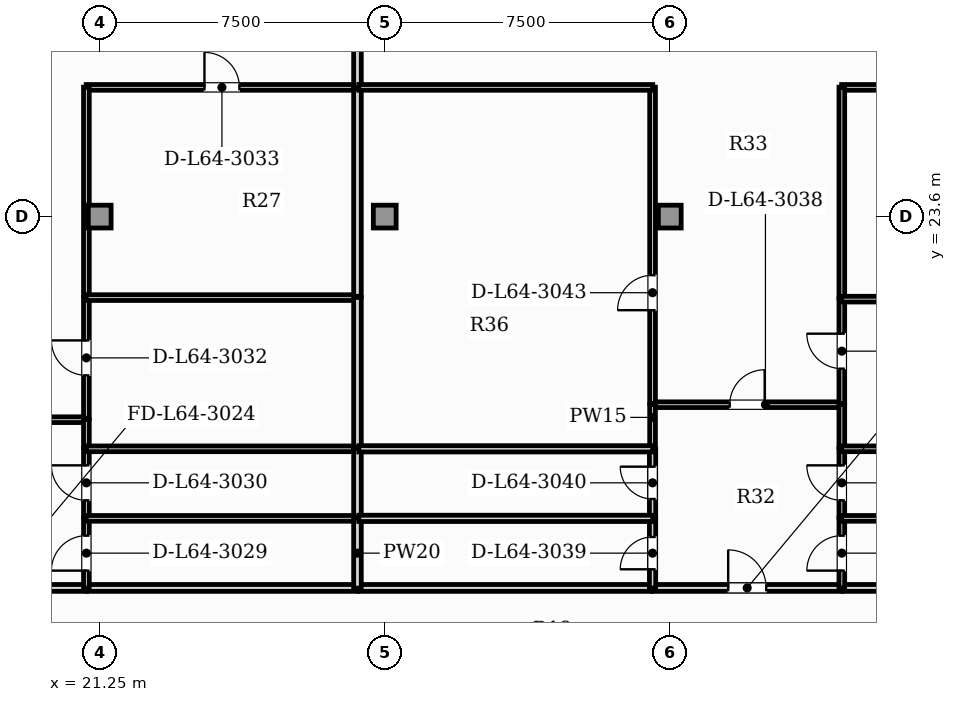
"""IFC4 building model, lengths in metres.
Left out: names, types, materials, properties, quantities, classifications, styles, units other than length and angle.
Written with IfcOpenShell. Run it as: python <this file> out.ifc"""

import sys

from ifc_helpers import new_model, si_unit, direction, frame, frame_2d, origin, origin_2d, place, context, subcontext, project, spatial, rectangle, extrude, element, fill, save


model = new_model("IFC4")
c1 = context("Model", 3, precision=1e-05, world=origin(), true_north=direction((0.0, 1.0)))
c2 = subcontext(c1, "Body", "Model", "MODEL_VIEW")
j1 = project(units=[si_unit("LENGTHUNIT", "METRE"), si_unit("PLANEANGLEUNIT", "RADIAN")], contexts=[c1])
p1 = place(None, origin())
s1 = spatial("IfcSite", under=j1, at=p1, CompositionType="ELEMENT")
p2 = place(p1, origin())
s2 = spatial("IfcBuilding", under=s1, at=p2, CompositionType="ELEMENT")
p3 = place(p2, frame((0.0, 0.0, 260.6)))
s3 = spatial("IfcBuildingStorey", under=s2, at=p3, CompositionType="ELEMENT", Elevation=260.6)
for number, where, z_axis, x_axis in (
    (1, (21.25, 23.6, 0.0), (0.0, 0.0, 1.0), (1.0, 0.0, 0.0)),
    (2, (28.75, 23.6, 0.0), (0.0, 0.0, 1.0), (1.0, 0.0, 0.0)),
    (3, (36.25, 23.6, 0.0), (0.0, 0.0, 1.0), (1.0, 0.0, 0.0)),
):
    element("IfcColumn", number, at=place(p3, frame(where, z_axis=z_axis, x_axis=x_axis)), inside=s3, PredefinedType="COLUMN", context=c2, shape_type="SweptSolid", body=[
        extrude(rectangle(XDim=0.6, YDim=0.6, at=origin_2d()), origin(), (0.0, 0.0, 1.0), 3.85),
    ])
p4 = place(p3, frame((15.915, 13.83, 0.0), z_axis=(0.0, 0.0, 1.0), x_axis=(1.0, 0.0, 0.0)))
e4 = element("IfcWall", 4, at=p4, inside=s3, PredefinedType="PARTITIONING", context=c2, shape_type="SweptSolid", body=[
    extrude(rectangle(XDim=4.99, YDim=0.18, at=frame_2d((2.495, 0.0))), origin(), (0.0, 0.0, 1.0), 3.65),
])
p5 = place(p4, frame((1.995, 0.0, 0.0)))
e5 = element("IfcOpeningElement", 5, at=p5, cuts=e4, PredefinedType="OPENING", context=c2, shape_type="SweptSolid", body=[
    extrude(rectangle(XDim=1.0, YDim=2.15, at=frame_2d((0.5, 1.075))), frame((0.0, 0.1, 0.0), z_axis=(0.0, -1.0, 0.0), x_axis=(1.0, 0.0, 0.0)), (0.0, 0.0, 1.0), 0.2),
])
p6 = place(p3, frame((20.935, 13.83, 0.0), z_axis=(0.0, 0.0, 1.0), x_axis=(1.0, 0.0, 0.0)))
e6 = element("IfcWall", 6, at=p6, inside=s3, PredefinedType="PARTITIONING", context=c2, shape_type="SweptSolid", body=[
    extrude(rectangle(XDim=7.103, YDim=0.18, at=frame_2d((3.551, 0.0))), origin(), (0.0, 0.0, 1.0), 3.65),
])
p7 = place(p3, frame((35.792, 13.83, 0.0), z_axis=(0.0, 0.0, 1.0), x_axis=(1.0, 0.0, 0.0)))
e7 = element("IfcWall", 7, at=p7, inside=s3, PredefinedType="PARTITIONING", context=c2, shape_type="SweptSolid", body=[
    extrude(rectangle(XDim=4.99, YDim=0.18, at=frame_2d((2.495, 0.0))), origin(), (0.0, 0.0, 1.0), 3.65),
])
p8 = place(p7, frame((1.995, 0.0, 0.0)))
e8 = element("IfcOpeningElement", 8, at=p8, cuts=e7, PredefinedType="OPENING", context=c2, shape_type="SweptSolid", body=[
    extrude(rectangle(XDim=1.0, YDim=2.15, at=frame_2d((0.5, 1.075))), frame((0.0, 0.1, 0.0), z_axis=(0.0, -1.0, 0.0), x_axis=(1.0, 0.0, 0.0)), (0.0, 0.0, 1.0), 0.2),
])
p9 = place(p3, frame((28.067, 13.83, 0.0), z_axis=(0.0, 0.0, 1.0), x_axis=(1.0, 0.0, 0.0)))
e9 = element("IfcWall", 9, at=p9, inside=s3, PredefinedType="PARTITIONING", context=c2, shape_type="SweptSolid", body=[
    extrude(rectangle(XDim=7.695, YDim=0.18, at=frame_2d((3.847, 0.0))), origin(), (0.0, 0.0, 1.0), 3.65),
])
p10 = place(p3, frame((40.812, 13.83, 0.0), z_axis=(0.0, 0.0, 1.0), x_axis=(1.0, 0.0, 0.0)))
e10 = element("IfcWall", 10, at=p10, inside=s3, PredefinedType="PARTITIONING", context=c2, shape_type="SweptSolid", body=[
    extrude(rectangle(XDim=8.541, YDim=0.18, at=frame_2d((4.271, 0.0))), origin(), (0.0, 0.0, 1.0), 3.65),
])
p11 = place(p3, frame((15.915, 18.256, 0.0), z_axis=(0.0, 0.0, 1.0), x_axis=(1.0, 0.0, 0.0)))
e11 = element("IfcWall", 11, at=p11, inside=s3, PredefinedType="PARTITIONING", context=c2, shape_type="SweptSolid", body=[
    extrude(rectangle(XDim=4.99, YDim=0.15, at=frame_2d((2.495, 0.0))), origin(), (0.0, 0.0, 1.0), 3.65),
])
p12 = place(p11, frame((2.035, 0.0, 0.0)))
e12 = element("IfcOpeningElement", 12, at=p12, cuts=e11, PredefinedType="OPENING", context=c2, shape_type="SweptSolid", body=[
    extrude(rectangle(XDim=0.92, YDim=2.1, at=frame_2d((0.46, 1.05))), frame((0.0, 0.085, 0.0), z_axis=(0.0, -1.0, 0.0), x_axis=(1.0, 0.0, 0.0)), (0.0, 0.0, 1.0), 0.17),
])
p13 = place(p3, frame((20.9, 13.825, 0.0), z_axis=(0.0, 0.0, 1.0), x_axis=(0.0, 1.0, 0.0)))
e13 = element("IfcWall", 13, at=p13, inside=s3, PredefinedType="PARTITIONING", context=c2, shape_type="SweptSolid", body=[
    extrude(rectangle(XDim=1.84, YDim=0.15, at=frame_2d((0.92, 0.0))), origin(), (0.0, 0.0, 1.0), 3.65),
])
p14 = place(p13, frame((0.46, 0.0, 0.0)))
e14 = element("IfcOpeningElement", 14, at=p14, cuts=e13, PredefinedType="OPENING", context=c2, shape_type="SweptSolid", body=[
    extrude(rectangle(XDim=0.92, YDim=2.1, at=frame_2d((0.46, 1.05))), frame((0.0, 0.085, 0.0), z_axis=(0.0, -1.0, 0.0), x_axis=(1.0, 0.0, 0.0)), (0.0, 0.0, 1.0), 0.17),
])
p15 = place(p3, frame((20.9, 15.695, 0.0), z_axis=(0.0, 0.0, 1.0), x_axis=(0.0, 1.0, 0.0)))
e15 = element("IfcWall", 15, at=p15, inside=s3, PredefinedType="PARTITIONING", context=c2, shape_type="SweptSolid", body=[
    extrude(rectangle(XDim=1.8, YDim=0.15, at=frame_2d((0.9, 0.0))), origin(), (0.0, 0.0, 1.0), 3.65),
])
p16 = place(p15, frame((0.44, 0.0, 0.0)))
e16 = element("IfcOpeningElement", 16, at=p16, cuts=e15, PredefinedType="OPENING", context=c2, shape_type="SweptSolid", body=[
    extrude(rectangle(XDim=0.92, YDim=2.1, at=frame_2d((0.46, 1.05))), frame((0.0, 0.085, 0.0), z_axis=(0.0, -1.0, 0.0), x_axis=(1.0, 0.0, 0.0)), (0.0, 0.0, 1.0), 0.17),
])
p17 = place(p3, frame((20.9, 17.525, 0.0), z_axis=(0.0, 0.0, 1.0), x_axis=(0.0, 1.0, 0.0)))
e17 = element("IfcWall", 17, at=p17, inside=s3, PredefinedType="PARTITIONING", context=c2, shape_type="SweptSolid", body=[
    extrude(rectangle(XDim=0.736, YDim=0.15, at=frame_2d((0.368, 0.0))), origin(), (0.0, 0.0, 1.0), 3.65),
])
p18 = place(p3, frame((20.9, 18.291, 0.0), z_axis=(0.0, 0.0, 1.0), x_axis=(0.0, 1.0, 0.0)))
e18 = element("IfcWall", 18, at=p18, inside=s3, PredefinedType="PARTITIONING", context=c2, shape_type="SweptSolid", body=[
    extrude(rectangle(XDim=3.182, YDim=0.15, at=frame_2d((1.591, 0.0))), origin(), (0.0, 0.0, 1.0), 3.65),
])
p19 = place(p18, frame((1.131, 0.0, 0.0)))
e19 = element("IfcOpeningElement", 19, at=p19, cuts=e18, PredefinedType="OPENING", context=c2, shape_type="SweptSolid", body=[
    extrude(rectangle(XDim=0.92, YDim=2.1, at=frame_2d((0.46, 1.05))), frame((0.0, 0.085, 0.0), z_axis=(0.0, -1.0, 0.0), x_axis=(1.0, 0.0, 0.0)), (0.0, 0.0, 1.0), 0.17),
])
p20 = place(p3, frame((20.895, 27.0, 0.0), z_axis=(0.0, 0.0, 1.0), x_axis=(1.0, 0.0, 0.0)))
e20 = element("IfcWall", 20, at=p20, inside=s3, PredefinedType="PARTITIONING", context=c2, shape_type="SweptSolid", body=[
    extrude(rectangle(XDim=7.143, YDim=0.15, at=frame_2d((3.571, 0.0))), origin(), (0.0, 0.0, 1.0), 3.65),
])
p21 = place(p20, frame((3.111, 0.0, 0.0)))
e21 = element("IfcOpeningElement", 21, at=p21, cuts=e20, PredefinedType="OPENING", context=c2, shape_type="SweptSolid", body=[
    extrude(rectangle(XDim=0.92, YDim=2.1, at=frame_2d((0.46, 1.05))), frame((0.0, 0.085, 0.0), z_axis=(0.0, -1.0, 0.0), x_axis=(1.0, 0.0, 0.0)), (0.0, 0.0, 1.0), 0.17),
])
p22 = place(p3, frame((20.9, 21.503, 0.0), z_axis=(0.0, 0.0, 1.0), x_axis=(0.0, 1.0, 0.0)))
e22 = element("IfcWall", 22, at=p22, inside=s3, PredefinedType="PARTITIONING", context=c2, shape_type="SweptSolid", body=[
    extrude(rectangle(XDim=5.501, YDim=0.15, at=frame_2d((2.751, 0.0))), origin(), (0.0, 0.0, 1.0), 3.65),
])
p23 = place(p3, frame((28.032, 26.995, 0.0), z_axis=(0.0, 0.0, 1.0), x_axis=(0.0, 1.0, 0.0)))
e23 = element("IfcWall", 23, at=p23, inside=s3, PredefinedType="PARTITIONING", context=c2, shape_type="SweptSolid", body=[
    extrude(rectangle(XDim=1.51, YDim=0.2, at=frame_2d((0.755, 0.0))), origin(), (0.0, 0.0, 1.0), 3.65),
])
p24 = place(p3, frame((20.895, 15.66, 0.0), z_axis=(0.0, 0.0, 1.0), x_axis=(1.0, 0.0, 0.0)))
e24 = element("IfcWall", 24, at=p24, inside=s3, PredefinedType="PARTITIONING", context=c2, shape_type="SweptSolid", body=[
    extrude(rectangle(XDim=7.143, YDim=0.15, at=frame_2d((3.571, 0.0))), origin(), (0.0, 0.0, 1.0), 3.65),
])
p25 = place(p3, frame((28.032, 13.825, 0.0), z_axis=(0.0, 0.0, 1.0), x_axis=(0.0, 1.0, 0.0)))
e25 = element("IfcWall", 25, at=p25, inside=s3, PredefinedType="PARTITIONING", context=c2, shape_type="SweptSolid", body=[
    extrude(rectangle(XDim=1.84, YDim=0.2, at=frame_2d((0.92, 0.0))), origin(), (0.0, 0.0, 1.0), 3.65),
])
p26 = place(p3, frame((20.895, 17.49, 0.0), z_axis=(0.0, 0.0, 1.0), x_axis=(1.0, 0.0, 0.0)))
e26 = element("IfcWall", 26, at=p26, inside=s3, PredefinedType="PARTITIONING", context=c2, shape_type="SweptSolid", body=[
    extrude(rectangle(XDim=7.143, YDim=0.15, at=frame_2d((3.571, 0.0))), origin(), (0.0, 0.0, 1.0), 3.65),
])
p27 = place(p3, frame((28.032, 15.695, 0.0), z_axis=(0.0, 0.0, 1.0), x_axis=(0.0, 1.0, 0.0)))
e27 = element("IfcWall", 27, at=p27, inside=s3, PredefinedType="PARTITIONING", context=c2, shape_type="SweptSolid", body=[
    extrude(rectangle(XDim=1.8, YDim=0.2, at=frame_2d((0.9, 0.0))), origin(), (0.0, 0.0, 1.0), 3.65),
])
p28 = place(p3, frame((20.895, 21.469, 0.0), z_axis=(0.0, 0.0, 1.0), x_axis=(1.0, 0.0, 0.0)))
e28 = element("IfcWall", 28, at=p28, inside=s3, PredefinedType="PARTITIONING", context=c2, shape_type="SweptSolid", body=[
    extrude(rectangle(XDim=7.143, YDim=0.15, at=frame_2d((3.571, 0.0))), origin(), (0.0, 0.0, 1.0), 3.65),
])
p29 = place(p3, frame((28.032, 17.525, 0.0), z_axis=(0.0, 0.0, 1.0), x_axis=(0.0, 1.0, 0.0)))
e29 = element("IfcWall", 29, at=p29, inside=s3, PredefinedType="PARTITIONING", context=c2, shape_type="SweptSolid", body=[
    extrude(rectangle(XDim=3.948, YDim=0.2, at=frame_2d((1.974, 0.0))), origin(), (0.0, 0.0, 1.0), 3.65),
])
p30 = place(p3, frame((28.032, 21.503, 0.0), z_axis=(0.0, 0.0, 1.0), x_axis=(0.0, 1.0, 0.0)))
e30 = element("IfcWall", 30, at=p30, inside=s3, PredefinedType="PARTITIONING", context=c2, shape_type="SweptSolid", body=[
    extrude(rectangle(XDim=5.462, YDim=0.2, at=frame_2d((2.731, 0.0))), origin(), (0.0, 0.0, 1.0), 3.65),
])
p31 = place(p3, frame((35.792, 18.651, 0.0), z_axis=(0.0, 0.0, 1.0), x_axis=(1.0, 0.0, 0.0)))
e31 = element("IfcWall", 31, at=p31, inside=s3, PredefinedType="PARTITIONING", context=c2, shape_type="SweptSolid", body=[
    extrude(rectangle(XDim=4.99, YDim=0.15, at=frame_2d((2.495, 0.0))), origin(), (0.0, 0.0, 1.0), 3.65),
])
p32 = place(p31, frame((2.035, 0.0, 0.0)))
e32 = element("IfcOpeningElement", 32, at=p32, cuts=e31, PredefinedType="OPENING", context=c2, shape_type="SweptSolid", body=[
    extrude(rectangle(XDim=0.92, YDim=2.1, at=frame_2d((0.46, 1.05))), frame((0.0, 0.085, 0.0), z_axis=(0.0, -1.0, 0.0), x_axis=(1.0, 0.0, 0.0)), (0.0, 0.0, 1.0), 0.17),
])
p33 = place(p3, frame((35.797, 13.825, 0.0), z_axis=(0.0, 0.0, 1.0), x_axis=(0.0, 1.0, 0.0)))
e33 = element("IfcWall", 33, at=p33, inside=s3, PredefinedType="PLUMBINGWALL", context=c2, shape_type="SweptSolid", body=[
    extrude(rectangle(XDim=1.84, YDim=0.165, at=frame_2d((0.92, 0.0))), origin(), (0.0, 0.0, 1.0), 3.65),
])
p34 = place(p33, frame((0.495, 0.0, 0.0)))
e34 = element("IfcOpeningElement", 34, at=p34, cuts=e33, PredefinedType="OPENING", context=c2, shape_type="SweptSolid", body=[
    extrude(rectangle(XDim=0.85, YDim=2.1, at=frame_2d((0.425, 1.05))), frame((0.0, 0.093, 0.0), z_axis=(0.0, -1.0, 0.0), x_axis=(1.0, 0.0, 0.0)), (0.0, 0.0, 1.0), 0.185),
])
p35 = place(p3, frame((35.797, 15.695, 0.0), z_axis=(0.0, 0.0, 1.0), x_axis=(0.0, 1.0, 0.0)))
e35 = element("IfcWall", 35, at=p35, inside=s3, PredefinedType="PLUMBINGWALL", context=c2, shape_type="SweptSolid", body=[
    extrude(rectangle(XDim=1.8, YDim=0.165, at=frame_2d((0.9, 0.0))), origin(), (0.0, 0.0, 1.0), 3.65),
])
p36 = place(p35, frame((0.475, 0.0, 0.0)))
e36 = element("IfcOpeningElement", 36, at=p36, cuts=e35, PredefinedType="OPENING", context=c2, shape_type="SweptSolid", body=[
    extrude(rectangle(XDim=0.85, YDim=2.1, at=frame_2d((0.425, 1.05))), frame((0.0, 0.093, 0.0), z_axis=(0.0, -1.0, 0.0), x_axis=(1.0, 0.0, 0.0)), (0.0, 0.0, 1.0), 0.185),
])
p37 = place(p3, frame((35.797, 17.525, 0.0), z_axis=(0.0, 0.0, 1.0), x_axis=(0.0, 1.0, 0.0)))
e37 = element("IfcWall", 37, at=p37, inside=s3, PredefinedType="PARTITIONING", context=c2, shape_type="SweptSolid", body=[
    extrude(rectangle(XDim=1.131, YDim=0.15, at=frame_2d((0.565, 0.0))), origin(), (0.0, 0.0, 1.0), 3.65),
])
p38 = place(p3, frame((40.777, 13.825, 0.0), z_axis=(0.0, 0.0, 1.0), x_axis=(0.0, 1.0, 0.0)))
e38 = element("IfcWall", 38, at=p38, inside=s3, PredefinedType="PARTITIONING", context=c2, shape_type="SweptSolid", body=[
    extrude(rectangle(XDim=1.84, YDim=0.15, at=frame_2d((0.92, 0.0))), origin(), (0.0, 0.0, 1.0), 3.65),
])
p39 = place(p38, frame((0.46, 0.0, 0.0)))
e39 = element("IfcOpeningElement", 39, at=p39, cuts=e38, PredefinedType="OPENING", context=c2, shape_type="SweptSolid", body=[
    extrude(rectangle(XDim=0.92, YDim=2.1, at=frame_2d((0.46, 1.05))), frame((0.0, 0.085, 0.0), z_axis=(0.0, -1.0, 0.0), x_axis=(1.0, 0.0, 0.0)), (0.0, 0.0, 1.0), 0.17),
])
p40 = place(p3, frame((40.777, 15.695, 0.0), z_axis=(0.0, 0.0, 1.0), x_axis=(0.0, 1.0, 0.0)))
e40 = element("IfcWall", 40, at=p40, inside=s3, PredefinedType="PARTITIONING", context=c2, shape_type="SweptSolid", body=[
    extrude(rectangle(XDim=1.8, YDim=0.15, at=frame_2d((0.9, 0.0))), origin(), (0.0, 0.0, 1.0), 3.65),
])
p41 = place(p40, frame((0.44, 0.0, 0.0)))
e41 = element("IfcOpeningElement", 41, at=p41, cuts=e40, PredefinedType="OPENING", context=c2, shape_type="SweptSolid", body=[
    extrude(rectangle(XDim=0.92, YDim=2.1, at=frame_2d((0.46, 1.05))), frame((0.0, 0.085, 0.0), z_axis=(0.0, -1.0, 0.0), x_axis=(1.0, 0.0, 0.0)), (0.0, 0.0, 1.0), 0.17),
])
p42 = place(p3, frame((40.777, 17.525, 0.0), z_axis=(0.0, 0.0, 1.0), x_axis=(0.0, 1.0, 0.0)))
e42 = element("IfcWall", 42, at=p42, inside=s3, PredefinedType="PARTITIONING", context=c2, shape_type="SweptSolid", body=[
    extrude(rectangle(XDim=1.131, YDim=0.15, at=frame_2d((0.565, 0.0))), origin(), (0.0, 0.0, 1.0), 3.65),
])
p43 = place(p3, frame((35.797, 18.686, 0.0), z_axis=(0.0, 0.0, 1.0), x_axis=(0.0, 1.0, 0.0)))
e43 = element("IfcWall", 43, at=p43, inside=s3, PredefinedType="PARTITIONING", context=c2, shape_type="SweptSolid", body=[
    extrude(rectangle(XDim=8.319, YDim=0.15, at=frame_2d((4.16, 0.0))), origin(), (0.0, 0.0, 1.0), 3.65),
])
p44 = place(p43, frame((2.452, 0.0, 0.0)))
e44 = element("IfcOpeningElement", 44, at=p44, cuts=e43, PredefinedType="OPENING", context=c2, shape_type="SweptSolid", body=[
    extrude(rectangle(XDim=0.92, YDim=2.1, at=frame_2d((0.46, 1.05))), frame((0.0, 0.085, 0.0), z_axis=(0.0, -1.0, 0.0), x_axis=(1.0, 0.0, 0.0)), (0.0, 0.0, 1.0), 0.17),
])
p45 = place(p3, frame((28.067, 27.0, 0.0), z_axis=(0.0, 0.0, 1.0), x_axis=(1.0, 0.0, 0.0)))
e45 = element("IfcWall", 45, at=p45, inside=s3, PredefinedType="PARTITIONING", context=c2, shape_type="SweptSolid", body=[
    extrude(rectangle(XDim=7.735, YDim=0.15, at=frame_2d((3.867, 0.0))), origin(), (0.0, 0.0, 1.0), 3.65),
])
p46 = place(p3, frame((40.777, 18.686, 0.0), z_axis=(0.0, 0.0, 1.0), x_axis=(0.0, 1.0, 0.0)))
e46 = element("IfcWall", 46, at=p46, inside=s3, PredefinedType="PARTITIONING", context=c2, shape_type="SweptSolid", body=[
    extrude(rectangle(XDim=2.747, YDim=0.15, at=frame_2d((1.374, 0.0))), origin(), (0.0, 0.0, 1.0), 3.65),
])
p47 = place(p46, frame((0.914, 0.0, 0.0)))
e47 = element("IfcOpeningElement", 47, at=p47, cuts=e46, PredefinedType="OPENING", context=c2, shape_type="SweptSolid", body=[
    extrude(rectangle(XDim=0.92, YDim=2.1, at=frame_2d((0.46, 1.05))), frame((0.0, 0.085, 0.0), z_axis=(0.0, -1.0, 0.0), x_axis=(1.0, 0.0, 0.0)), (0.0, 0.0, 1.0), 0.17),
])
p48 = place(p3, frame((40.772, 27.0, 0.0), z_axis=(0.0, 0.0, 1.0), x_axis=(1.0, 0.0, 0.0)))
e48 = element("IfcWall", 48, at=p48, inside=s3, PredefinedType="PARTITIONING", context=c2, shape_type="SweptSolid", body=[
    extrude(rectangle(XDim=8.581, YDim=0.15, at=frame_2d((4.29, 0.0))), origin(), (0.0, 0.0, 1.0), 3.65),
])
p49 = place(p48, frame((3.83, 0.0, 0.0)))
e49 = element("IfcOpeningElement", 49, at=p49, cuts=e48, PredefinedType="OPENING", context=c2, shape_type="SweptSolid", body=[
    extrude(rectangle(XDim=0.92, YDim=2.1, at=frame_2d((0.46, 1.05))), frame((0.0, 0.085, 0.0), z_axis=(0.0, -1.0, 0.0), x_axis=(1.0, 0.0, 0.0)), (0.0, 0.0, 1.0), 0.17),
])
p50 = place(p3, frame((40.777, 21.463, 0.0), z_axis=(0.0, 0.0, 1.0), x_axis=(0.0, 1.0, 0.0)))
e50 = element("IfcWall", 50, at=p50, inside=s3, PredefinedType="PARTITIONING", context=c2, shape_type="SweptSolid", body=[
    extrude(rectangle(XDim=5.542, YDim=0.15, at=frame_2d((2.771, 0.0))), origin(), (0.0, 0.0, 1.0), 3.65),
])
for number, where, z_axis, x_axis in (
    (51, (28.067, 15.66, 0.0), (0.0, 0.0, 1.0), (1.0, 0.0, 0.0)),
    (52, (28.067, 17.49, 0.0), (0.0, 0.0, 1.0), (1.0, 0.0, 0.0)),
):
    element("IfcWall", number, at=place(p3, frame(where, z_axis=z_axis, x_axis=x_axis)), inside=s3, PredefinedType="PLUMBINGWALL", context=c2, shape_type="SweptSolid", body=[
        extrude(rectangle(XDim=7.735, YDim=0.165, at=frame_2d((3.867, 0.0))), origin(), (0.0, 0.0, 1.0), 3.65),
    ])
for number, where, z_axis, x_axis in (
    (53, (40.772, 15.66, 0.0), (0.0, 0.0, 1.0), (1.0, 0.0, 0.0)),
    (54, (40.772, 17.49, 0.0), (0.0, 0.0, 1.0), (1.0, 0.0, 0.0)),
):
    element("IfcWall", number, at=place(p3, frame(where, z_axis=z_axis, x_axis=x_axis)), inside=s3, PredefinedType="PARTITIONING", context=c2, shape_type="SweptSolid", body=[
        extrude(rectangle(XDim=8.581, YDim=0.15, at=frame_2d((4.29, 0.0))), origin(), (0.0, 0.0, 1.0), 3.65),
    ])
p51 = place(p3, frame((40.772, 21.428, 0.0), z_axis=(0.0, 0.0, 1.0), x_axis=(1.0, 0.0, 0.0)))
e55 = element("IfcWall", 55, at=p51, inside=s3, PredefinedType="PARTITIONING", context=c2, shape_type="SweptSolid", body=[
    extrude(rectangle(XDim=6.581, YDim=0.15, at=frame_2d((3.29, 0.0))), origin(), (0.0, 0.0, 1.0), 3.65),
])
p52 = place(p8, origin())
e56 = element("IfcDoor", 56, at=p52, inside=s3, OperationType="SINGLE_SWING_LEFT", PredefinedType="DOOR", context=c2, shape_type="SweptSolid", body=[
    extrude(rectangle(XDim=1.0, YDim=2.15, at=frame_2d((0.5, 1.075))), frame((0.0, 0.025, 0.0), z_axis=(0.0, -1.0, 0.0), x_axis=(1.0, 0.0, 0.0)), (0.0, 0.0, 1.0), 0.05),
])
fill(e8, e56)
p53 = place(p14, origin())
e57 = element("IfcDoor", 57, at=p53, inside=s3, OperationType="SINGLE_SWING_LEFT", PredefinedType="DOOR", context=c2, shape_type="SweptSolid", body=[
    extrude(rectangle(XDim=0.92, YDim=2.1, at=frame_2d((0.46, 1.05))), frame((0.0, 0.025, 0.0), z_axis=(0.0, -1.0, 0.0), x_axis=(1.0, 0.0, 0.0)), (0.0, 0.0, 1.0), 0.05),
])
fill(e14, e57)
p54 = place(p16, origin())
e58 = element("IfcDoor", 58, at=p54, inside=s3, OperationType="SINGLE_SWING_RIGHT", PredefinedType="DOOR", context=c2, shape_type="SweptSolid", body=[
    extrude(rectangle(XDim=0.92, YDim=2.1, at=frame_2d((0.46, 1.05))), frame((0.0, 0.025, 0.0), z_axis=(0.0, -1.0, 0.0), x_axis=(1.0, 0.0, 0.0)), (0.0, 0.0, 1.0), 0.05),
])
fill(e16, e58)
p55 = place(p19, origin())
e59 = element("IfcDoor", 59, at=p55, inside=s3, OperationType="SINGLE_SWING_RIGHT", PredefinedType="DOOR", context=c2, shape_type="SweptSolid", body=[
    extrude(rectangle(XDim=0.92, YDim=2.1, at=frame_2d((0.46, 1.05))), frame((0.0, 0.025, 0.0), z_axis=(0.0, -1.0, 0.0), x_axis=(1.0, 0.0, 0.0)), (0.0, 0.0, 1.0), 0.05),
])
fill(e19, e59)
p56 = place(p21, origin())
e60 = element("IfcDoor", 60, at=p56, inside=s3, OperationType="SINGLE_SWING_LEFT", PredefinedType="DOOR", context=c2, shape_type="SweptSolid", body=[
    extrude(rectangle(XDim=0.92, YDim=2.1, at=frame_2d((0.46, 1.05))), frame((0.0, 0.025, 0.0), z_axis=(0.0, -1.0, 0.0), x_axis=(1.0, 0.0, 0.0)), (0.0, 0.0, 1.0), 0.05),
])
fill(e21, e60)
p57 = place(p32, origin())
e61 = element("IfcDoor", 61, at=p57, inside=s3, OperationType="SINGLE_SWING_RIGHT", PredefinedType="DOOR", context=c2, shape_type="SweptSolid", body=[
    extrude(rectangle(XDim=0.92, YDim=2.1, at=frame_2d((0.46, 1.05))), frame((0.0, 0.025, 0.0), z_axis=(0.0, -1.0, 0.0), x_axis=(1.0, 0.0, 0.0)), (0.0, 0.0, 1.0), 0.05),
])
fill(e32, e61)
p58 = place(p34, origin())
e62 = element("IfcDoor", 62, at=p58, inside=s3, OperationType="SINGLE_SWING_LEFT", PredefinedType="DOOR", context=c2, shape_type="SweptSolid", body=[
    extrude(rectangle(XDim=0.85, YDim=2.1, at=frame_2d((0.425, 1.05))), frame((0.0, 0.025, 0.0), z_axis=(0.0, -1.0, 0.0), x_axis=(1.0, 0.0, 0.0)), (0.0, 0.0, 1.0), 0.05),
])
fill(e34, e62)
p59 = place(p36, origin())
e63 = element("IfcDoor", 63, at=p59, inside=s3, OperationType="SINGLE_SWING_RIGHT", PredefinedType="DOOR", context=c2, shape_type="SweptSolid", body=[
    extrude(rectangle(XDim=0.85, YDim=2.1, at=frame_2d((0.425, 1.05))), frame((0.0, 0.025, 0.0), z_axis=(0.0, -1.0, 0.0), x_axis=(1.0, 0.0, 0.0)), (0.0, 0.0, 1.0), 0.05),
])
fill(e36, e63)
p60 = place(p39, origin())
e64 = element("IfcDoor", 64, at=p60, inside=s3, OperationType="SINGLE_SWING_LEFT", PredefinedType="DOOR", context=c2, shape_type="SweptSolid", body=[
    extrude(rectangle(XDim=0.92, YDim=2.1, at=frame_2d((0.46, 1.05))), frame((0.0, 0.025, 0.0), z_axis=(0.0, -1.0, 0.0), x_axis=(1.0, 0.0, 0.0)), (0.0, 0.0, 1.0), 0.05),
])
fill(e39, e64)
p61 = place(p41, origin())
e65 = element("IfcDoor", 65, at=p61, inside=s3, OperationType="SINGLE_SWING_RIGHT", PredefinedType="DOOR", context=c2, shape_type="SweptSolid", body=[
    extrude(rectangle(XDim=0.92, YDim=2.1, at=frame_2d((0.46, 1.05))), frame((0.0, 0.025, 0.0), z_axis=(0.0, -1.0, 0.0), x_axis=(1.0, 0.0, 0.0)), (0.0, 0.0, 1.0), 0.05),
])
fill(e41, e65)
p62 = place(p44, origin())
e66 = element("IfcDoor", 66, at=p62, inside=s3, OperationType="SINGLE_SWING_LEFT", PredefinedType="DOOR", context=c2, shape_type="SweptSolid", body=[
    extrude(rectangle(XDim=0.92, YDim=2.1, at=frame_2d((0.46, 1.05))), frame((0.0, 0.025, 0.0), z_axis=(0.0, -1.0, 0.0), x_axis=(1.0, 0.0, 0.0)), (0.0, 0.0, 1.0), 0.05),
])
fill(e44, e66)
p63 = place(p47, origin())
e67 = element("IfcDoor", 67, at=p63, inside=s3, OperationType="SINGLE_SWING_RIGHT", PredefinedType="DOOR", context=c2, shape_type="SweptSolid", body=[
    extrude(rectangle(XDim=0.92, YDim=2.1, at=frame_2d((0.46, 1.05))), frame((0.0, 0.025, 0.0), z_axis=(0.0, -1.0, 0.0), x_axis=(1.0, 0.0, 0.0)), (0.0, 0.0, 1.0), 0.05),
])
fill(e47, e67)
save(model, sys.argv[1])
